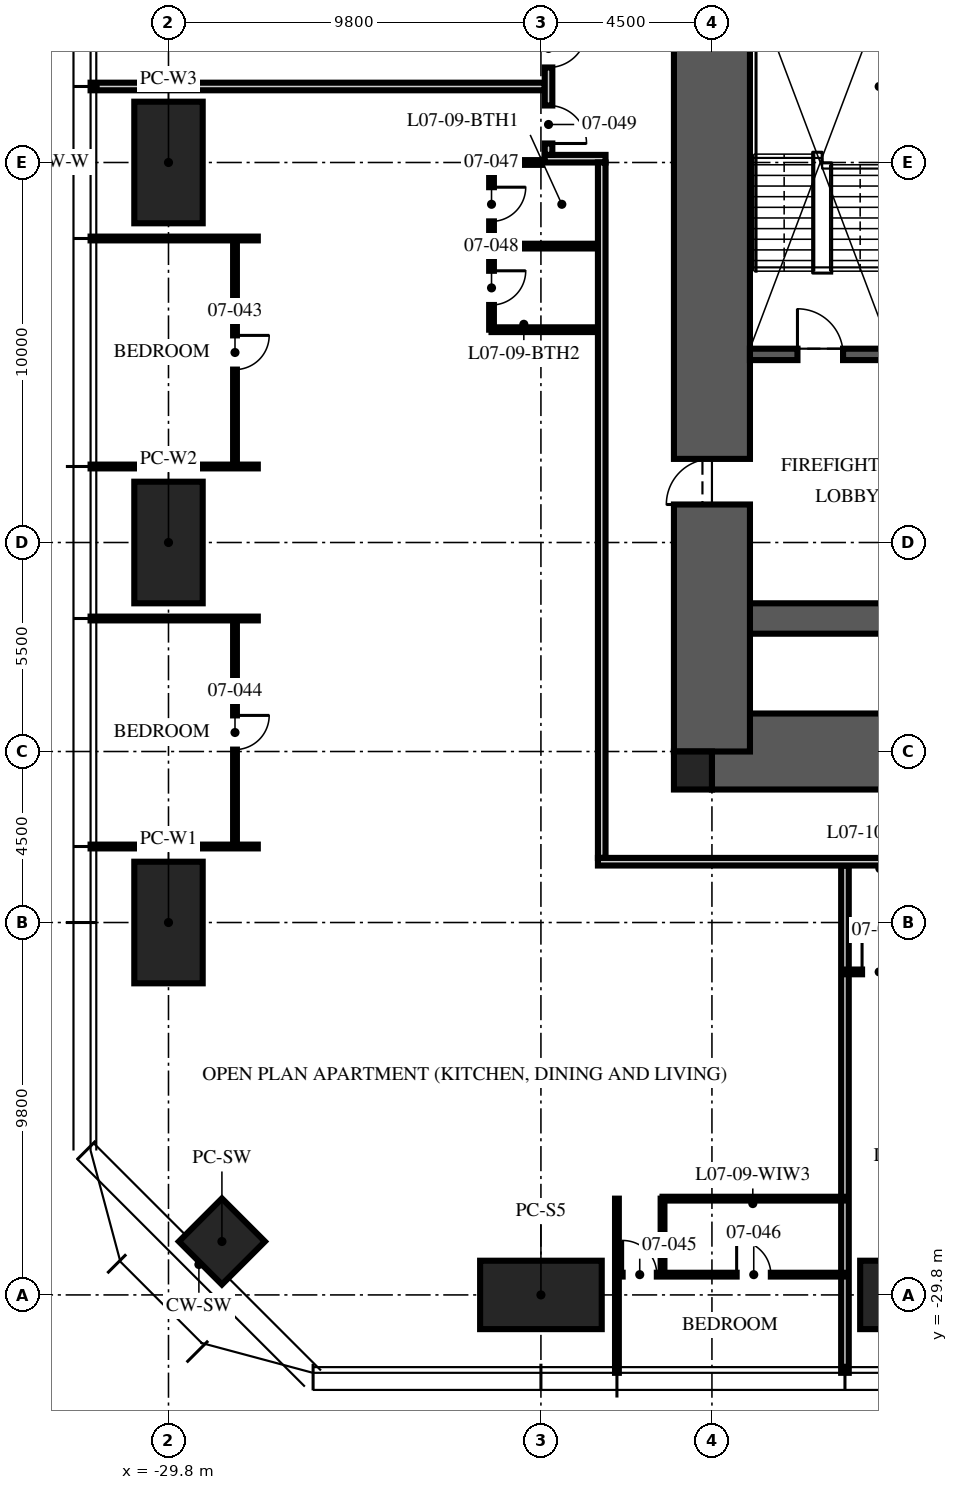
"""IFC4 building model, lengths in metres.
Left out: names, types, materials, properties, quantities, classifications, styles, units other than length and angle.
Written with IfcOpenShell. Run it as: python <this file> out.ifc"""

import sys

from ifc_helpers import new_model, si_unit, direction, frame, frame_2d, origin, origin_2d, place, context, subcontext, project, spatial, rectangle, hollow_rectangle, extrude, element, fill, save


model = new_model("IFC4")
c1 = context("Model", 3, precision=1e-05, world=origin(), true_north=direction((0.0, 1.0)))
c2 = subcontext(c1, "Body", "Model", "MODEL_VIEW")
j1 = project(units=[si_unit("LENGTHUNIT", "METRE"), si_unit("PLANEANGLEUNIT", "RADIAN")], contexts=[c1])
p1 = place(None, origin())
s1 = spatial("IfcSite", under=j1, at=p1, CompositionType="ELEMENT")
p2 = place(p1, origin())
s2 = spatial("IfcBuilding", under=s1, at=p2, CompositionType="ELEMENT")
p3 = place(p2, frame((0.0, 0.0, 32.25)))
s3 = spatial("IfcBuildingStorey", under=s2, at=p3, CompositionType="ELEMENT", Elevation=32.25)
p4 = place(p3, frame((-15.5, -15.5, -0.25), z_axis=(0.0, 0.0, 1.0), x_axis=(1.0, 0.0, 0.0)))
e1 = element("IfcWall", 1, at=p4, inside=s3, PredefinedType="SHEAR", context=c2, shape_type="SweptSolid", body=[
    extrude(rectangle(XDim=31.0, YDim=2.0, at=frame_2d((15.5, 0.0))), origin(), (0.0, 0.0, 1.0), 3.75),
])
p5 = place(p3, frame((-15.5, -12.0, -0.25), z_axis=(0.0, 0.0, 1.0), x_axis=(1.0, 0.0, 0.0)))
e2 = element("IfcWall", 2, at=p5, inside=s3, PredefinedType="SHEAR", context=c2, shape_type="SweptSolid", body=[
    extrude(rectangle(XDim=31.0, YDim=0.8, at=frame_2d((15.5, 0.0))), origin(), (0.0, 0.0, 1.0), 3.75),
])
p6 = place(p3, frame((-15.5, -15.5, -0.25), z_axis=(0.0, 0.0, 1.0), x_axis=(0.0, 1.0, 0.0)))
e3 = element("IfcWall", 3, at=p6, inside=s3, PredefinedType="SHEAR", context=c2, shape_type="SweptSolid", body=[
    extrude(rectangle(XDim=31.0, YDim=2.0, at=frame_2d((15.5, 0.0))), origin(), (0.0, 0.0, 1.0), 3.75),
])
p7 = place(p6, frame((6.5, 0.0, 0.25)))
e4 = element("IfcOpeningElement", 4, at=p7, cuts=e3, PredefinedType="OPENING", context=c2, shape_type="SweptSolid", body=[
    extrude(rectangle(XDim=1.2, YDim=2.1, at=frame_2d((0.6, 1.05))), frame((0.0, 1.01, 0.0), z_axis=(0.0, -1.0, 0.0), x_axis=(1.0, 0.0, 0.0)), (0.0, 0.0, 1.0), 2.02),
])
p8 = place(p6, frame((23.0, 0.0, 0.25)))
e5 = element("IfcOpeningElement", 5, at=p8, cuts=e3, PredefinedType="OPENING", context=c2, shape_type="SweptSolid", body=[
    extrude(rectangle(XDim=1.8, YDim=2.1, at=frame_2d((0.9, 1.05))), frame((0.0, 1.01, 0.0), z_axis=(0.0, -1.0, 0.0), x_axis=(1.0, 0.0, 0.0)), (0.0, 0.0, 1.0), 2.02),
])
p9 = place(p3, frame((-16.0, -16.0, -0.25), z_axis=(0.0, 0.0, 1.0), x_axis=(1.0, 0.0, 0.0)))
e6 = element("IfcColumn", 6, at=p9, inside=s3, PredefinedType="COLUMN", context=c2, shape_type="SweptSolid", body=[
    extrude(rectangle(XDim=1.0, YDim=1.0, at=origin_2d()), origin(), (0.0, 0.0, 1.0), 3.75),
])
for number, where, z_axis, x_axis in (
    (7, (-10.0, -29.8, 0.0), (0.0, 0.0, 1.0), (1.0, 0.0, 0.0)),
    (8, (-20.0, -29.8, 0.0), (0.0, 0.0, 1.0), (1.0, 0.0, 0.0)),
    (9, (-29.8, -20.0, 0.0), (0.0, 0.0, 1.0), (0.0, 1.0, 0.0)),
    (10, (-29.8, -10.0, 0.0), (0.0, 0.0, 1.0), (0.0, 1.0, 0.0)),
    (11, (-29.8, 0.0, 0.0), (0.0, 0.0, 1.0), (0.0, 1.0, 0.0)),
):
    element("IfcColumn", number, at=place(p3, frame(where, z_axis=z_axis, x_axis=x_axis)), inside=s3, PredefinedType="COLUMN", context=c2, shape_type="SweptSolid", body=[
        extrude(hollow_rectangle(XDim=3.2, YDim=1.8, WallThickness=0.2, at=origin_2d()), origin(), (0.0, 0.0, 1.0), 3.75),
    ])
p10 = place(p3, frame((-28.394, -28.394, 0.0), z_axis=(0.0, 0.0, 1.0), x_axis=(0.707106781187, -0.707106781187, 0.0)))
e12 = element("IfcColumn", 12, at=p10, inside=s3, PredefinedType="COLUMN", context=c2, shape_type="SweptSolid", body=[
    extrude(hollow_rectangle(XDim=1.6, YDim=1.6, WallThickness=0.1, at=origin_2d()), origin(), (0.0, 0.0, 1.0), 3.75),
])
p11 = place(p3, frame((-14.5, -5.05, 0.0), z_axis=(0.0, 0.0, 1.0), x_axis=(1.0, 0.0, 0.0)))
e13 = element("IfcWall", 13, at=p11, inside=s3, PredefinedType="SOLIDWALL", context=c2, shape_type="SweptSolid", body=[
    extrude(rectangle(XDim=5.7, YDim=0.3, at=frame_2d((2.85, 0.0))), origin(), (0.0, 0.0, 1.0), 3.5),
])
p12 = place(p11, frame((1.25, 0.0, 0.0)))
e14 = element("IfcOpeningElement", 14, at=p12, cuts=e13, PredefinedType="OPENING", context=c2, shape_type="SweptSolid", body=[
    extrude(rectangle(XDim=1.2, YDim=2.1, at=frame_2d((0.6, 1.05))), frame((0.0, 0.16, 0.0), z_axis=(0.0, -1.0, 0.0), x_axis=(1.0, 0.0, 0.0)), (0.0, 0.0, 1.0), 0.32),
])
p13 = place(p3, frame((-19.9, 2.0, 0.0), z_axis=(0.0, 0.0, 1.0), x_axis=(-1.0, 0.0, 0.0)))
e15 = element("IfcWall", 15, at=p13, inside=s3, PredefinedType="PARTITIONING", context=c2, shape_type="SweptSolid", body=[
    extrude(rectangle(XDim=11.95, YDim=0.2, at=frame_2d((5.975, 0.0))), origin(), (0.0, 0.0, 1.0), 2.71),
])
for number, where, z_axis, x_axis in (
    (16, (-27.45, -2.0, 0.0), (0.0, 0.0, 1.0), (-1.0, 0.0, 0.0)),
    (17, (-27.45, -8.0, 0.0), (0.0, 0.0, 1.0), (-1.0, 0.0, 0.0)),
    (18, (-27.45, -12.0, 0.0), (0.0, 0.0, 1.0), (-1.0, 0.0, 0.0)),
    (19, (-27.45, -18.0, 0.0), (0.0, 0.0, 1.0), (-1.0, 0.0, 0.0)),
):
    element("IfcWall", number, at=place(p3, frame(where, z_axis=z_axis, x_axis=x_axis)), inside=s3, PredefinedType="PARTITIONING", context=c2, shape_type="SweptSolid", body=[
        extrude(rectangle(XDim=4.4, YDim=0.1, at=frame_2d((2.2, 0.0))), origin(), (0.0, 0.0, 1.0), 2.71),
    ])
p14 = place(p3, frame((-18.0, -27.267, 0.0), z_axis=(0.0, 0.0, 1.0), x_axis=(0.0, -1.0, 0.0)))
e20 = element("IfcWall", 20, at=p14, inside=s3, PredefinedType="PARTITIONING", context=c2, shape_type="SweptSolid", body=[
    extrude(rectangle(XDim=4.583, YDim=0.1, at=frame_2d((2.292, 0.0))), origin(), (0.0, 0.0, 1.0), 2.71),
])
p15 = place(p3, frame((-12.0, -18.5, 0.0), z_axis=(0.0, 0.0, 1.0), x_axis=(0.0, -1.0, 0.0)))
e21 = element("IfcWall", 21, at=p15, inside=s3, PredefinedType="PARTITIONING", context=c2, shape_type="SweptSolid", body=[
    extrude(rectangle(XDim=13.35, YDim=0.2, at=frame_2d((6.675, 0.0))), origin(), (0.0, 0.0, 1.0), 2.71),
])
p16 = place(p3, frame((-28.05, -2.0, 0.0), z_axis=(0.0, 0.0, 1.0), x_axis=(0.0, -1.0, 0.0)))
e22 = element("IfcWall", 22, at=p16, inside=s3, PredefinedType="PARTITIONING", context=c2, shape_type="SweptSolid", body=[
    extrude(rectangle(XDim=6.0, YDim=0.1, at=frame_2d((3.0, 0.0))), origin(), (0.0, 0.0, 1.0), 2.61),
])
p17 = place(p16, frame((2.55, 0.0, 0.0)))
e23 = element("IfcOpeningElement", 23, at=p17, cuts=e22, PredefinedType="OPENING", context=c2, shape_type="SweptSolid", body=[
    extrude(rectangle(XDim=0.9, YDim=2.1, at=frame_2d((0.45, 1.05))), frame((0.0, 0.06, 0.0), z_axis=(0.0, -1.0, 0.0), x_axis=(1.0, 0.0, 0.0)), (0.0, 0.0, 1.0), 0.12),
])
p18 = place(p3, frame((-28.05, -12.0, 0.0), z_axis=(0.0, 0.0, 1.0), x_axis=(0.0, -1.0, 0.0)))
e24 = element("IfcWall", 24, at=p18, inside=s3, PredefinedType="PARTITIONING", context=c2, shape_type="SweptSolid", body=[
    extrude(rectangle(XDim=6.0, YDim=0.1, at=frame_2d((3.0, 0.0))), origin(), (0.0, 0.0, 1.0), 2.61),
])
p19 = place(p18, frame((2.55, 0.0, 0.0)))
e25 = element("IfcOpeningElement", 25, at=p19, cuts=e24, PredefinedType="OPENING", context=c2, shape_type="SweptSolid", body=[
    extrude(rectangle(XDim=0.9, YDim=2.1, at=frame_2d((0.45, 1.05))), frame((0.0, 0.06, 0.0), z_axis=(0.0, -1.0, 0.0), x_axis=(1.0, 0.0, 0.0)), (0.0, 0.0, 1.0), 0.12),
])
p20 = place(p3, frame((-18.0, -29.267, 0.0), z_axis=(0.0, 0.0, 1.0), x_axis=(1.0, 0.0, 0.0)))
e26 = element("IfcWall", 26, at=p20, inside=s3, PredefinedType="PARTITIONING", context=c2, shape_type="SweptSolid", body=[
    extrude(rectangle(XDim=6.0, YDim=0.1, at=frame_2d((3.0, 0.0))), origin(), (0.0, 0.0, 1.0), 2.61),
])
p21 = place(p20, frame((0.15, 0.0, 0.0)))
e27 = element("IfcOpeningElement", 27, at=p21, cuts=e26, PredefinedType="OPENING", context=c2, shape_type="SweptSolid", body=[
    extrude(rectangle(XDim=0.9, YDim=2.1, at=frame_2d((0.45, 1.05))), frame((0.0, 0.06, 0.0), z_axis=(0.0, -1.0, 0.0), x_axis=(1.0, 0.0, 0.0)), (0.0, 0.0, 1.0), 0.12),
])
p22 = place(p20, frame((3.15, 0.0, 0.0)))
e28 = element("IfcOpeningElement", 28, at=p22, cuts=e26, PredefinedType="OPENING", context=c2, shape_type="SweptSolid", body=[
    extrude(rectangle(XDim=0.9, YDim=2.1, at=frame_2d((0.45, 1.05))), frame((0.0, 0.06, 0.0), z_axis=(0.0, -1.0, 0.0), x_axis=(1.0, 0.0, 0.0)), (0.0, 0.0, 1.0), 0.12),
])
p23 = place(p3, frame((-16.8, -27.267, 0.0), z_axis=(0.0, 0.0, 1.0), x_axis=(0.0, -1.0, 0.0)))
e29 = element("IfcWall", 29, at=p23, inside=s3, PredefinedType="PARTITIONING", context=c2, shape_type="SweptSolid", body=[
    extrude(rectangle(XDim=2.0, YDim=0.1, at=frame_2d((1.0, 0.0))), origin(), (0.0, 0.0, 1.0), 3.5),
])
p24 = place(p3, frame((-16.8, -27.267, 0.0), z_axis=(0.0, 0.0, 1.0), x_axis=(1.0, 0.0, 0.0)))
e30 = element("IfcWall", 30, at=p24, inside=s3, PredefinedType="PARTITIONING", context=c2, shape_type="SweptSolid", body=[
    extrude(rectangle(XDim=4.8, YDim=0.1, at=frame_2d((2.4, 0.0))), origin(), (0.0, 0.0, 1.0), 2.61),
])
p25 = place(p3, frame((-21.3, 0.0, 0.0), z_axis=(0.0, 0.0, 1.0), x_axis=(0.0, -1.0, 0.0)))
e31 = element("IfcWall", 31, at=p25, inside=s3, PredefinedType="PARTITIONING", context=c2, shape_type="SweptSolid", body=[
    extrude(rectangle(XDim=4.4, YDim=0.125, at=frame_2d((2.2, 0.0))), origin(), (0.0, 0.0, 1.0), 2.492),
])
p26 = place(p25, frame((0.65, 0.0, 0.0)))
e32 = element("IfcOpeningElement", 32, at=p26, cuts=e31, PredefinedType="OPENING", context=c2, shape_type="SweptSolid", body=[
    extrude(rectangle(XDim=0.9, YDim=2.1, at=frame_2d((0.45, 1.05))), frame((0.0, 0.073, 0.0), z_axis=(0.0, -1.0, 0.0), x_axis=(1.0, 0.0, 0.0)), (0.0, 0.0, 1.0), 0.145),
])
p27 = place(p25, frame((2.85, 0.0, 0.0)))
e33 = element("IfcOpeningElement", 33, at=p27, cuts=e31, PredefinedType="OPENING", context=c2, shape_type="SweptSolid", body=[
    extrude(rectangle(XDim=0.9, YDim=2.1, at=frame_2d((0.45, 1.05))), frame((0.0, 0.073, 0.0), z_axis=(0.0, -1.0, 0.0), x_axis=(1.0, 0.0, 0.0)), (0.0, 0.0, 1.0), 0.145),
])
p28 = place(p3, frame((-19.97, 0.0, 0.0), z_axis=(0.0, 0.0, 1.0), x_axis=(-1.0, 0.0, 0.0)))
e34 = element("IfcWall", 34, at=p28, inside=s3, PredefinedType="PARTITIONING", context=c2, shape_type="SweptSolid", body=[
    extrude(rectangle(XDim=1.33, YDim=0.125, at=frame_2d((0.665, 0.0))), origin(), (0.0, 0.0, 1.0), 2.492),
])
for number, where, z_axis, x_axis in (
    (35, (-18.5, -2.2, 0.0), (0.0, 0.0, 1.0), (-1.0, 0.0, 0.0)),
    (36, (-18.5, -4.4, 0.0), (0.0, 0.0, 1.0), (-1.0, 0.0, 0.0)),
):
    element("IfcWall", number, at=place(p3, frame(where, z_axis=z_axis, x_axis=x_axis)), inside=s3, PredefinedType="PARTITIONING", context=c2, shape_type="SweptSolid", body=[
        extrude(rectangle(XDim=2.8, YDim=0.125, at=frame_2d((1.4, 0.0))), origin(), (0.0, 0.0, 1.0), 3.5),
    ])
p29 = place(p3, frame((-12.0, -21.3, 0.0), z_axis=(0.0, 0.0, 1.0), x_axis=(1.0, 0.0, 0.0)))
e37 = element("IfcWall", 37, at=p29, inside=s3, PredefinedType="PARTITIONING", context=c2, shape_type="SweptSolid", body=[
    extrude(rectangle(XDim=1.8, YDim=0.125, at=frame_2d((0.9, 0.0))), origin(), (0.0, 0.0, 1.0), 3.5),
])
p30 = place(p29, frame((0.45, 0.0, 0.0)))
e38 = element("IfcOpeningElement", 38, at=p30, cuts=e37, PredefinedType="OPENING", context=c2, shape_type="SweptSolid", body=[
    extrude(rectangle(XDim=0.9, YDim=2.1, at=frame_2d((0.45, 1.05))), frame((0.0, 0.073, 0.0), z_axis=(0.0, -1.0, 0.0), x_axis=(1.0, 0.0, 0.0)), (0.0, 0.0, 1.0), 0.145),
])
p31 = place(p3, frame((-18.3, 0.1, 0.0), z_axis=(0.0, 0.0, 1.0), x_axis=(-1.0, 0.0, 0.0)))
e39 = element("IfcWall", 39, at=p31, inside=s3, PredefinedType="PARTITIONING", context=c2, shape_type="SweptSolid", body=[
    extrude(rectangle(XDim=1.6, YDim=0.2, at=frame_2d((0.8, 0.0))), origin(), (0.0, 0.0, 1.0), 2.492),
])
p32 = place(p3, frame((-19.8, 3.8, 0.0), z_axis=(0.0, 0.0, 1.0), x_axis=(0.0, -1.0, 0.0)))
e40 = element("IfcWall", 40, at=p32, inside=s3, PredefinedType="PARTITIONING", context=c2, shape_type="SweptSolid", body=[
    extrude(rectangle(XDim=3.6, YDim=0.2, at=frame_2d((1.8, 0.0))), origin(), (0.0, 0.0, 1.0), 3.5),
])
p33 = place(p32, frame((0.3, 0.0, 0.0)))
e41 = element("IfcOpeningElement", 41, at=p33, cuts=e40, PredefinedType="OPENING", context=c2, shape_type="SweptSolid", body=[
    extrude(rectangle(XDim=1.0, YDim=2.2, at=frame_2d((0.5, 1.1))), frame((0.0, 0.11, 0.0), z_axis=(0.0, -1.0, 0.0), x_axis=(1.0, 0.0, 0.0)), (0.0, 0.0, 1.0), 0.22),
])
p34 = place(p32, frame((2.3, 0.0, 0.0)))
e42 = element("IfcOpeningElement", 42, at=p34, cuts=e40, PredefinedType="OPENING", context=c2, shape_type="SweptSolid", body=[
    extrude(rectangle(XDim=1.0, YDim=2.2, at=frame_2d((0.5, 1.1))), frame((0.0, 0.11, 0.0), z_axis=(0.0, -1.0, 0.0), x_axis=(1.0, 0.0, 0.0)), (0.0, 0.0, 1.0), 0.22),
])
p35 = place(p3, frame((-18.4, 0.0, 0.0), z_axis=(0.0, 0.0, 1.0), x_axis=(0.0, -1.0, 0.0)))
e43 = element("IfcWall", 43, at=p35, inside=s3, PredefinedType="PARTITIONING", context=c2, shape_type="SweptSolid", body=[
    extrude(rectangle(XDim=18.3, YDim=0.2, at=frame_2d((9.15, 0.0))), origin(), (0.0, 0.0, 1.0), 2.3),
])
p36 = place(p3, frame((-10.0, -18.4, 0.0), z_axis=(0.0, 0.0, 1.0), x_axis=(-1.0, 0.0, 0.0)))
e44 = element("IfcWall", 44, at=p36, inside=s3, PredefinedType="PARTITIONING", context=c2, shape_type="SweptSolid", body=[
    extrude(rectangle(XDim=8.5, YDim=0.2, at=frame_2d((4.25, 0.0))), origin(), (0.0, 0.0, 1.0), 2.3),
])
p37 = place(p12, origin())
e45 = element("IfcDoor", 45, at=p37, inside=s3, OperationType="SINGLE_SWING_LEFT", PredefinedType="DOOR", context=c2, shape_type="SweptSolid", body=[
    extrude(rectangle(XDim=1.2, YDim=2.1, at=frame_2d((0.6, 1.05))), frame((0.0, 0.025, 0.0), z_axis=(0.0, -1.0, 0.0), x_axis=(1.0, 0.0, 0.0)), (0.0, 0.0, 1.0), 0.05),
])
fill(e14, e45)
p38 = place(p7, origin())
e46 = element("IfcDoor", 46, at=p38, inside=s3, OperationType="SINGLE_SWING_LEFT", PredefinedType="DOOR", context=c2, shape_type="SweptSolid", body=[
    extrude(rectangle(XDim=1.2, YDim=2.1, at=frame_2d((0.6, 1.05))), frame((0.0, 0.025, 0.0), z_axis=(0.0, -1.0, 0.0), x_axis=(1.0, 0.0, 0.0)), (0.0, 0.0, 1.0), 0.05),
])
fill(e4, e46)
p39 = place(p33, origin())
e47 = element("IfcDoor", 47, at=p39, inside=s3, OperationType="SINGLE_SWING_LEFT", PredefinedType="DOOR", context=c2, shape_type="SweptSolid", body=[
    extrude(rectangle(XDim=1.0, YDim=2.2, at=frame_2d((0.5, 1.1))), frame((0.0, 0.025, 0.0), z_axis=(0.0, -1.0, 0.0), x_axis=(1.0, 0.0, 0.0)), (0.0, 0.0, 1.0), 0.05),
])
fill(e41, e47)
p40 = place(p17, origin())
e48 = element("IfcDoor", 48, at=p40, inside=s3, OperationType="SINGLE_SWING_LEFT", PredefinedType="DOOR", context=c2, shape_type="SweptSolid", body=[
    extrude(rectangle(XDim=0.9, YDim=2.1, at=frame_2d((0.45, 1.05))), frame((0.0, 0.025, 0.0), z_axis=(0.0, -1.0, 0.0), x_axis=(1.0, 0.0, 0.0)), (0.0, 0.0, 1.0), 0.05),
])
fill(e23, e48)
p41 = place(p19, origin())
e49 = element("IfcDoor", 49, at=p41, inside=s3, OperationType="SINGLE_SWING_LEFT", PredefinedType="DOOR", context=c2, shape_type="SweptSolid", body=[
    extrude(rectangle(XDim=0.9, YDim=2.1, at=frame_2d((0.45, 1.05))), frame((0.0, 0.025, 0.0), z_axis=(0.0, -1.0, 0.0), x_axis=(1.0, 0.0, 0.0)), (0.0, 0.0, 1.0), 0.05),
])
fill(e25, e49)
p42 = place(p21, origin())
e50 = element("IfcDoor", 50, at=p42, inside=s3, OperationType="SINGLE_SWING_LEFT", PredefinedType="DOOR", context=c2, shape_type="SweptSolid", body=[
    extrude(rectangle(XDim=0.9, YDim=2.1, at=frame_2d((0.45, 1.05))), frame((0.0, 0.025, 0.0), z_axis=(0.0, -1.0, 0.0), x_axis=(1.0, 0.0, 0.0)), (0.0, 0.0, 1.0), 0.05),
])
fill(e27, e50)
p43 = place(p22, origin())
e51 = element("IfcDoor", 51, at=p43, inside=s3, OperationType="SINGLE_SWING_LEFT", PredefinedType="DOOR", context=c2, shape_type="SweptSolid", body=[
    extrude(rectangle(XDim=0.9, YDim=2.1, at=frame_2d((0.45, 1.05))), frame((0.0, 0.025, 0.0), z_axis=(0.0, -1.0, 0.0), x_axis=(1.0, 0.0, 0.0)), (0.0, 0.0, 1.0), 0.05),
])
fill(e28, e51)
p44 = place(p26, origin())
e52 = element("IfcDoor", 52, at=p44, inside=s3, OperationType="SINGLE_SWING_LEFT", PredefinedType="DOOR", context=c2, shape_type="SweptSolid", body=[
    extrude(rectangle(XDim=0.9, YDim=2.1, at=frame_2d((0.45, 1.05))), frame((0.0, 0.025, 0.0), z_axis=(0.0, -1.0, 0.0), x_axis=(1.0, 0.0, 0.0)), (0.0, 0.0, 1.0), 0.05),
])
fill(e32, e52)
p45 = place(p27, origin())
e53 = element("IfcDoor", 53, at=p45, inside=s3, OperationType="SINGLE_SWING_LEFT", PredefinedType="DOOR", context=c2, shape_type="SweptSolid", body=[
    extrude(rectangle(XDim=0.9, YDim=2.1, at=frame_2d((0.45, 1.05))), frame((0.0, 0.025, 0.0), z_axis=(0.0, -1.0, 0.0), x_axis=(1.0, 0.0, 0.0)), (0.0, 0.0, 1.0), 0.05),
])
fill(e33, e53)
p46 = place(p34, origin())
e54 = element("IfcDoor", 54, at=p46, inside=s3, OperationType="SINGLE_SWING_RIGHT", PredefinedType="DOOR", context=c2, shape_type="SweptSolid", body=[
    extrude(rectangle(XDim=1.0, YDim=2.2, at=frame_2d((0.5, 1.1))), frame((0.0, 0.025, 0.0), z_axis=(0.0, -1.0, 0.0), x_axis=(1.0, 0.0, 0.0)), (0.0, 0.0, 1.0), 0.05),
])
fill(e42, e54)
p47 = place(p30, origin())
e55 = element("IfcDoor", 55, at=p47, inside=s3, OperationType="SINGLE_SWING_LEFT", PredefinedType="DOOR", context=c2, shape_type="SweptSolid", body=[
    extrude(rectangle(XDim=0.9, YDim=2.1, at=frame_2d((0.45, 1.05))), frame((0.0, 0.025, 0.0), z_axis=(0.0, -1.0, 0.0), x_axis=(1.0, 0.0, 0.0)), (0.0, 0.0, 1.0), 0.05),
])
fill(e38, e55)
save(model, sys.argv[1])
